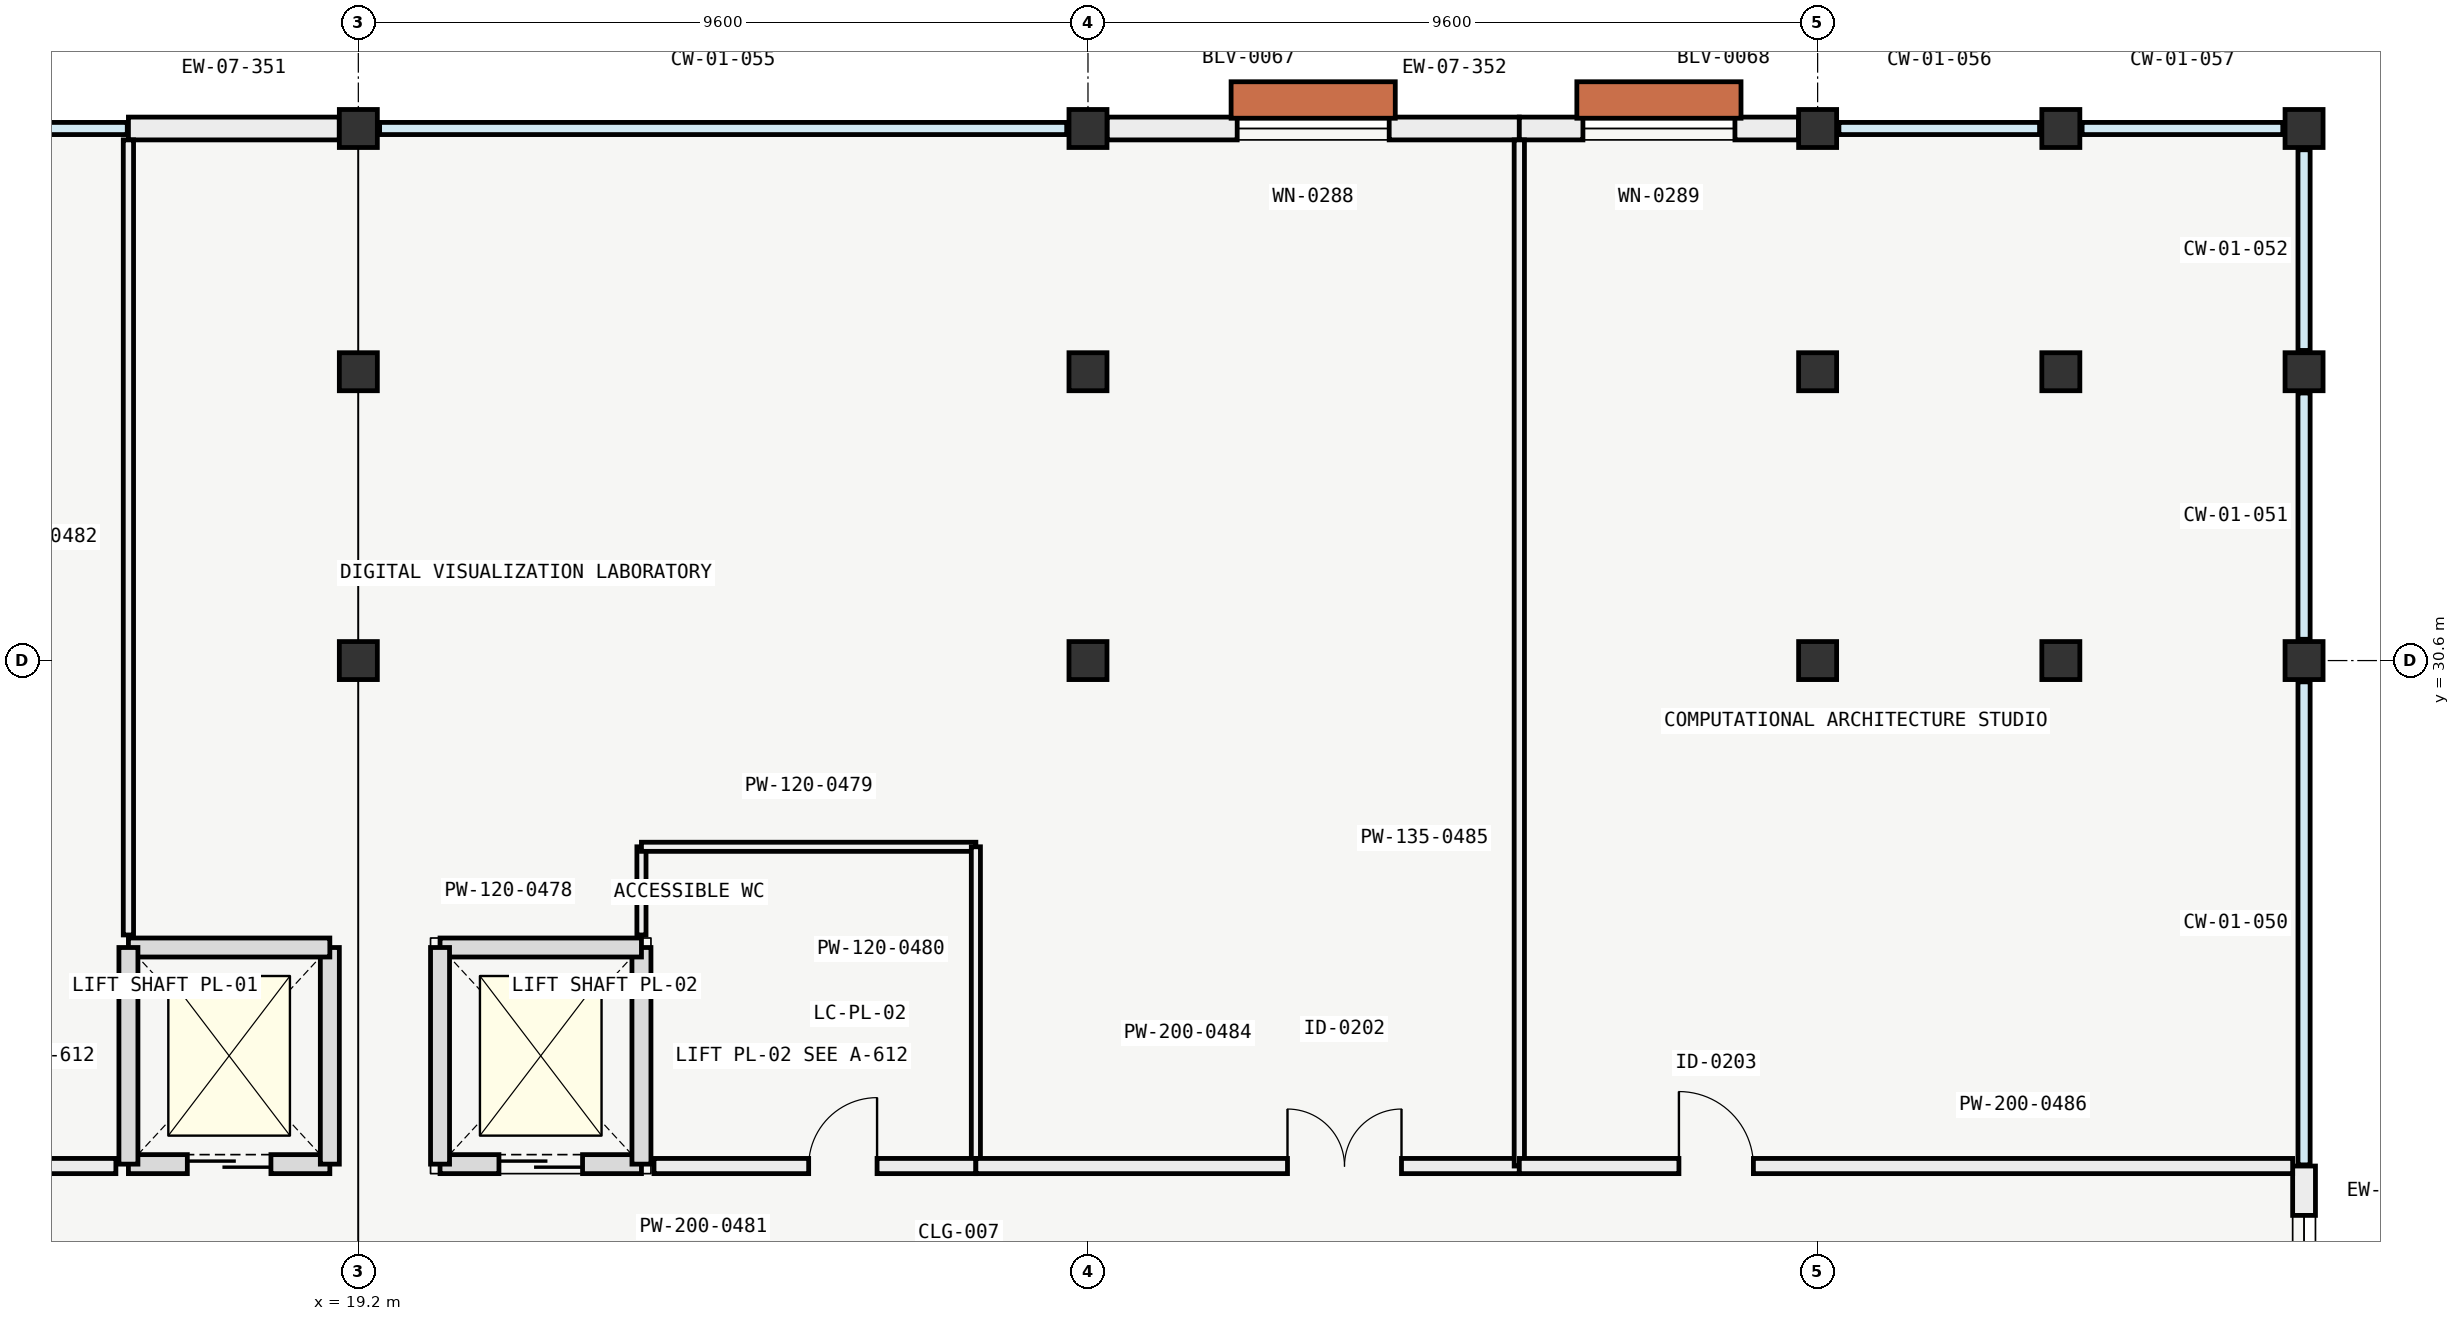
"""IFC4 building model, lengths in metres.
Left out: names, types, materials, properties, quantities, classifications, styles, units other than length and angle.
Written with IfcOpenShell. Run it as: python <this file> out.ifc"""

import sys

from ifc_helpers import new_model, si_unit, direction, frame, frame_2d, origin, origin_2d, place, context, subcontext, project, spatial, rectangle, extrude, element, fill, save


model = new_model("IFC4")
c1 = context("Model", 3, precision=1e-05, world=origin(), true_north=direction((0.0, 1.0)))
c2 = subcontext(c1, "Body", "Model", "MODEL_VIEW")
j1 = project(units=[si_unit("LENGTHUNIT", "METRE"), si_unit("PLANEANGLEUNIT", "RADIAN")], contexts=[c1])
p1 = place(None, origin())
s1 = spatial("IfcSite", under=j1, at=p1, CompositionType="ELEMENT")
p2 = place(p1, origin())
s2 = spatial("IfcBuilding", under=s1, at=p2, CompositionType="ELEMENT")
p3 = place(p2, frame((0.0, 0.0, 26.4)))
s3 = spatial("IfcBuildingStorey", under=s2, at=p3, CompositionType="ELEMENT", Elevation=26.4)
for number, where, z_axis, x_axis in (
    (1, (19.2, 30.6, 0.0), (0.0, 0.0, 1.0), (1.0, 0.0, 0.0)),
    (2, (19.2, 34.4, 0.0), (0.0, 0.0, 1.0), (1.0, 0.0, 0.0)),
    (3, (19.2, 37.6, 0.0), (0.0, 0.0, 1.0), (1.0, 0.0, 0.0)),
    (4, (28.8, 30.6, 0.0), (0.0, 0.0, 1.0), (1.0, 0.0, 0.0)),
    (5, (28.8, 34.4, 0.0), (0.0, 0.0, 1.0), (1.0, 0.0, 0.0)),
    (6, (28.8, 37.6, 0.0), (0.0, 0.0, 1.0), (1.0, 0.0, 0.0)),
    (7, (38.4, 30.6, 0.0), (0.0, 0.0, 1.0), (1.0, 0.0, 0.0)),
    (8, (38.4, 34.4, 0.0), (0.0, 0.0, 1.0), (1.0, 0.0, 0.0)),
    (9, (38.4, 37.6, 0.0), (0.0, 0.0, 1.0), (1.0, 0.0, 0.0)),
    (10, (41.6, 30.6, 0.0), (0.0, 0.0, 1.0), (1.0, 0.0, 0.0)),
    (11, (41.6, 34.4, 0.0), (0.0, 0.0, 1.0), (1.0, 0.0, 0.0)),
    (12, (41.6, 37.6, 0.0), (0.0, 0.0, 1.0), (1.0, 0.0, 0.0)),
    (13, (44.8, 30.6, 0.0), (0.0, 0.0, 1.0), (1.0, 0.0, 0.0)),
    (14, (44.8, 34.4, 0.0), (0.0, 0.0, 1.0), (1.0, 0.0, 0.0)),
    (15, (44.8, 37.6, 0.0), (0.0, 0.0, 1.0), (1.0, 0.0, 0.0)),
):
    element("IfcColumn", number, at=place(p3, frame(where, z_axis=z_axis, x_axis=x_axis)), inside=s3, PredefinedType="COLUMN", context=c2, shape_type="SweptSolid", body=[
        extrude(rectangle(XDim=0.5, YDim=0.5, at=origin_2d()), origin(), (0.0, 0.0, 1.0), 4.2),
    ])
p4 = place(p3, frame((44.8, 23.95, 0.0), z_axis=(0.0, 0.0, 1.0), x_axis=(0.0, -1.0, 0.0)))
e16 = element("IfcWall", 16, at=p4, inside=s3, PredefinedType="SOLIDWALL", context=c2, shape_type="SweptSolid", body=[
    extrude(rectangle(XDim=3.299, YDim=0.3, at=frame_2d((1.649, 0.0))), origin(), (0.0, 0.0, 1.0), 2.355),
])
p5 = place(p4, frame((0.649, 0.0, 0.75)))
e17 = element("IfcOpeningElement", 17, at=p5, cuts=e16, PredefinedType="OPENING", context=c2, shape_type="SweptSolid", body=[
    extrude(rectangle(XDim=2.0, YDim=1.35, at=frame_2d((1.0, 0.675))), frame((0.0, 0.16, 0.0), z_axis=(0.0, -1.0, 0.0), x_axis=(1.0, 0.0, 0.0)), (0.0, 0.0, 1.0), 0.32),
])
p6 = place(p3, frame((16.175, 37.6, 0.0), z_axis=(0.0, 0.0, 1.0), x_axis=(1.0, 0.0, 0.0)))
e18 = element("IfcWall", 18, at=p6, inside=s3, PredefinedType="SOLIDWALL", context=c2, shape_type="SweptSolid", body=[
    extrude(rectangle(XDim=2.774, YDim=0.3, at=frame_2d((1.387, 0.0))), origin(), (0.0, 0.0, 1.0), 2.355),
])
p7 = place(p3, frame((29.051, 37.6, 0.0), z_axis=(0.0, 0.0, 1.0), x_axis=(1.0, 0.0, 0.0)))
e19 = element("IfcWall", 19, at=p7, inside=s3, PredefinedType="SOLIDWALL", context=c2, shape_type="SweptSolid", body=[
    extrude(rectangle(XDim=5.424, YDim=0.3, at=frame_2d((2.712, 0.0))), origin(), (0.0, 0.0, 1.0), 2.355),
])
p8 = place(p7, frame((1.712, 0.0, 0.85)))
e20 = element("IfcOpeningElement", 20, at=p8, cuts=e19, PredefinedType="OPENING", context=c2, shape_type="SweptSolid", body=[
    extrude(rectangle(XDim=2.0, YDim=1.35, at=frame_2d((1.0, 0.675))), frame((0.0, 0.16, 0.0), z_axis=(0.0, -1.0, 0.0), x_axis=(1.0, 0.0, 0.0)), (0.0, 0.0, 1.0), 0.32),
])
p9 = place(p3, frame((34.475, 37.6, 0.0), z_axis=(0.0, 0.0, 1.0), x_axis=(1.0, 0.0, 0.0)))
e21 = element("IfcWall", 21, at=p9, inside=s3, PredefinedType="SOLIDWALL", context=c2, shape_type="SweptSolid", body=[
    extrude(rectangle(XDim=3.674, YDim=0.3, at=frame_2d((1.837, 0.0))), origin(), (0.0, 0.0, 1.0), 2.355),
])
p10 = place(p9, frame((0.837, 0.0, 0.85)))
e22 = element("IfcOpeningElement", 22, at=p10, cuts=e21, PredefinedType="OPENING", context=c2, shape_type="SweptSolid", body=[
    extrude(rectangle(XDim=2.0, YDim=1.35, at=frame_2d((1.0, 0.675))), frame((0.0, 0.16, 0.0), z_axis=(0.0, -1.0, 0.0), x_axis=(1.0, 0.0, 0.0)), (0.0, 0.0, 1.0), 0.32),
])
p11 = place(p3, frame((16.175, 23.975, 0.0), z_axis=(0.0, 0.0, 1.0), x_axis=(1.0, 0.0, 0.0)))
e23 = element("IfcWall", 23, at=p11, inside=s3, PredefinedType="SOLIDWALL", context=c2, shape_type="SweptSolid", body=[
    extrude(rectangle(XDim=2.65, YDim=0.25, at=frame_2d((1.325, 0.0))), origin(), (0.0, 0.0, 1.0), 3.975),
])
p12 = place(p11, frame((0.775, 0.0, 0.0)))
e24 = element("IfcOpeningElement", 24, at=p12, cuts=e23, PredefinedType="OPENING", context=c2, shape_type="SweptSolid", body=[
    extrude(rectangle(XDim=1.1, YDim=2.1, at=frame_2d((0.55, 1.05))), frame((0.0, 0.135, 0.0), z_axis=(0.0, -1.0, 0.0), x_axis=(1.0, 0.0, 0.0)), (0.0, 0.0, 1.0), 0.27),
])
p13 = place(p3, frame((18.825, 23.975, 0.0), z_axis=(0.0, 0.0, 1.0), x_axis=(0.0, 1.0, 0.0)))
e25 = element("IfcWall", 25, at=p13, inside=s3, PredefinedType="SOLIDWALL", context=c2, shape_type="SweptSolid", body=[
    extrude(rectangle(XDim=2.85, YDim=0.25, at=frame_2d((1.425, 0.0))), origin(), (0.0, 0.0, 1.0), 3.975),
])
p14 = place(p3, frame((18.825, 26.825, 0.0), z_axis=(0.0, 0.0, 1.0), x_axis=(-1.0, 0.0, 0.0)))
e26 = element("IfcWall", 26, at=p14, inside=s3, PredefinedType="SOLIDWALL", context=c2, shape_type="SweptSolid", body=[
    extrude(rectangle(XDim=2.65, YDim=0.25, at=frame_2d((1.325, 0.0))), origin(), (0.0, 0.0, 1.0), 3.975),
])
p15 = place(p3, frame((16.175, 26.825, 0.0), z_axis=(0.0, 0.0, 1.0), x_axis=(0.0, -1.0, 0.0)))
e27 = element("IfcWall", 27, at=p15, inside=s3, PredefinedType="SOLIDWALL", context=c2, shape_type="SweptSolid", body=[
    extrude(rectangle(XDim=2.85, YDim=0.25, at=frame_2d((1.425, 0.0))), origin(), (0.0, 0.0, 1.0), 3.975),
])
p16 = place(p3, frame((20.275, 23.975, 0.0), z_axis=(0.0, 0.0, 1.0), x_axis=(1.0, 0.0, 0.0)))
e28 = element("IfcWall", 28, at=p16, inside=s3, PredefinedType="SOLIDWALL", context=c2, shape_type="SweptSolid", body=[
    extrude(rectangle(XDim=2.65, YDim=0.25, at=frame_2d((1.325, 0.0))), origin(), (0.0, 0.0, 1.0), 3.4),
])
p17 = place(p16, frame((0.775, 0.0, 0.0)))
e29 = element("IfcOpeningElement", 29, at=p17, cuts=e28, PredefinedType="OPENING", context=c2, shape_type="SweptSolid", body=[
    extrude(rectangle(XDim=1.1, YDim=2.1, at=frame_2d((0.55, 1.05))), frame((0.0, 0.135, 0.0), z_axis=(0.0, -1.0, 0.0), x_axis=(1.0, 0.0, 0.0)), (0.0, 0.0, 1.0), 0.27),
])
p18 = place(p3, frame((22.925, 23.975, 0.0), z_axis=(0.0, 0.0, 1.0), x_axis=(0.0, 1.0, 0.0)))
e30 = element("IfcWall", 30, at=p18, inside=s3, PredefinedType="SOLIDWALL", context=c2, shape_type="SweptSolid", body=[
    extrude(rectangle(XDim=2.85, YDim=0.25, at=frame_2d((1.425, 0.0))), origin(), (0.0, 0.0, 1.0), 3.4),
])
p19 = place(p3, frame((22.925, 26.825, 0.0), z_axis=(0.0, 0.0, 1.0), x_axis=(-1.0, 0.0, 0.0)))
e31 = element("IfcWall", 31, at=p19, inside=s3, PredefinedType="SOLIDWALL", context=c2, shape_type="SweptSolid", body=[
    extrude(rectangle(XDim=2.65, YDim=0.25, at=frame_2d((1.325, 0.0))), origin(), (0.0, 0.0, 1.0), 3.4),
])
p20 = place(p3, frame((20.275, 26.825, 0.0), z_axis=(0.0, 0.0, 1.0), x_axis=(0.0, -1.0, 0.0)))
e32 = element("IfcWall", 32, at=p20, inside=s3, PredefinedType="SOLIDWALL", context=c2, shape_type="SweptSolid", body=[
    extrude(rectangle(XDim=2.85, YDim=0.25, at=frame_2d((1.425, 0.0))), origin(), (0.0, 0.0, 1.0), 3.4),
])
p21 = place(p3, frame((22.925, 26.99, 0.0), z_axis=(0.0, 0.0, 1.0), x_axis=(0.0, 1.0, 0.0)))
e33 = element("IfcWall", 33, at=p21, inside=s3, PredefinedType="PARTITIONING", context=c2, shape_type="SweptSolid", body=[
    extrude(rectangle(XDim=1.16, YDim=0.12, at=frame_2d((0.58, 0.0))), origin(), (0.0, 0.0, 1.0), 3.85),
])
p22 = place(p3, frame((22.925, 28.15, 0.0), z_axis=(0.0, 0.0, 1.0), x_axis=(1.0, 0.0, 0.0)))
e34 = element("IfcWall", 34, at=p22, inside=s3, PredefinedType="PARTITIONING", context=c2, shape_type="SweptSolid", body=[
    extrude(rectangle(XDim=4.4, YDim=0.12, at=frame_2d((2.2, 0.0))), origin(), (0.0, 0.0, 1.0), 3.85),
])
p23 = place(p3, frame((27.325, 23.95, 0.0), z_axis=(0.0, 0.0, 1.0), x_axis=(0.0, 1.0, 0.0)))
e35 = element("IfcWall", 35, at=p23, inside=s3, PredefinedType="PARTITIONING", context=c2, shape_type="SweptSolid", body=[
    extrude(rectangle(XDim=4.2, YDim=0.12, at=frame_2d((2.1, 0.0))), origin(), (0.0, 0.0, 1.0), 3.505),
])
p24 = place(p3, frame((23.09, 23.95, 0.0), z_axis=(0.0, 0.0, 1.0), x_axis=(1.0, 0.0, 0.0)))
e36 = element("IfcWall", 36, at=p24, inside=s3, PredefinedType="PARTITIONING", context=c2, shape_type="SweptSolid", body=[
    extrude(rectangle(XDim=4.235, YDim=0.2, at=frame_2d((2.117, 0.0))), origin(), (0.0, 0.0, 1.0), 3.85),
])
p25 = place(p24, frame((2.035, 0.0, 0.0)))
e37 = element("IfcOpeningElement", 37, at=p25, cuts=e36, PredefinedType="OPENING", context=c2, shape_type="SweptSolid", body=[
    extrude(rectangle(XDim=0.9, YDim=2.05, at=frame_2d((0.45, 1.025))), frame((0.0, 0.11, 0.0), z_axis=(0.0, -1.0, 0.0), x_axis=(1.0, 0.0, 0.0)), (0.0, 0.0, 1.0), 0.22),
])
p26 = place(p3, frame((16.175, 26.99, 0.0), z_axis=(0.0, 0.0, 1.0), x_axis=(0.0, 1.0, 0.0)))
e38 = element("IfcWall", 38, at=p26, inside=s3, PredefinedType="PARTITIONING", context=c2, shape_type="SweptSolid", body=[
    extrude(rectangle(XDim=10.46, YDim=0.135, at=frame_2d((5.23, 0.0))), origin(), (0.0, 0.0, 1.0), 3.305),
])
p27 = place(p3, frame((0.15, 23.95, 0.0), z_axis=(0.0, 0.0, 1.0), x_axis=(1.0, 0.0, 0.0)))
e39 = element("IfcWall", 39, at=p27, inside=s3, PredefinedType="PARTITIONING", context=c2, shape_type="SweptSolid", body=[
    extrude(rectangle(XDim=15.86, YDim=0.2, at=frame_2d((7.93, 0.0))), origin(), (0.0, 0.0, 1.0), 3.305),
])
p28 = place(p27, frame((6.05, 0.0, 0.0)))
e40 = element("IfcOpeningElement", 40, at=p28, cuts=e39, PredefinedType="OPENING", context=c2, shape_type="SweptSolid", body=[
    extrude(rectangle(XDim=1.5, YDim=2.2, at=frame_2d((0.75, 1.1))), frame((0.0, 0.11, 0.0), z_axis=(0.0, -1.0, 0.0), x_axis=(1.0, 0.0, 0.0)), (0.0, 0.0, 1.0), 0.22),
])
p29 = place(p3, frame((27.325, 23.95, 0.0), z_axis=(0.0, 0.0, 1.0), x_axis=(1.0, 0.0, 0.0)))
e41 = element("IfcWall", 41, at=p29, inside=s3, PredefinedType="PARTITIONING", context=c2, shape_type="SweptSolid", body=[
    extrude(rectangle(XDim=7.15, YDim=0.2, at=frame_2d((3.575, 0.0))), origin(), (0.0, 0.0, 1.0), 3.305),
])
p30 = place(p29, frame((4.1, 0.0, 0.0)))
e42 = element("IfcOpeningElement", 42, at=p30, cuts=e41, PredefinedType="OPENING", context=c2, shape_type="SweptSolid", body=[
    extrude(rectangle(XDim=1.5, YDim=2.2, at=frame_2d((0.75, 1.1))), frame((0.0, 0.11, 0.0), z_axis=(0.0, -1.0, 0.0), x_axis=(1.0, 0.0, 0.0)), (0.0, 0.0, 1.0), 0.22),
])
p31 = place(p3, frame((34.475, 23.95, 0.0), z_axis=(0.0, 0.0, 1.0), x_axis=(0.0, 1.0, 0.0)))
e43 = element("IfcWall", 43, at=p31, inside=s3, PredefinedType="PARTITIONING", context=c2, shape_type="SweptSolid", body=[
    extrude(rectangle(XDim=13.5, YDim=0.135, at=frame_2d((6.75, 0.0))), origin(), (0.0, 0.0, 1.0), 3.305),
])
p32 = place(p3, frame((34.475, 23.95, 0.0), z_axis=(0.0, 0.0, 1.0), x_axis=(1.0, 0.0, 0.0)))
e44 = element("IfcWall", 44, at=p32, inside=s3, PredefinedType="PARTITIONING", context=c2, shape_type="SweptSolid", body=[
    extrude(rectangle(XDim=10.175, YDim=0.2, at=frame_2d((5.087, 0.0))), origin(), (0.0, 0.0, 1.0), 3.305),
])
p33 = place(p32, frame((2.1, 0.0, 0.0)))
e45 = element("IfcOpeningElement", 45, at=p33, cuts=e44, PredefinedType="OPENING", context=c2, shape_type="SweptSolid", body=[
    extrude(rectangle(XDim=0.98, YDim=2.15, at=frame_2d((0.49, 1.075))), frame((0.0, 0.11, 0.0), z_axis=(0.0, -1.0, 0.0), x_axis=(1.0, 0.0, 0.0)), (0.0, 0.0, 1.0), 0.22),
])
p34 = place(p5, origin())
e46 = element("IfcWindow", 46, at=p34, inside=s3, PartitioningType="SINGLE_PANEL", PredefinedType="WINDOW", context=c2, shape_type="SweptSolid", body=[
    extrude(rectangle(XDim=2.0, YDim=1.35, at=frame_2d((1.0, 0.675))), frame((0.0, 0.03, 0.0), z_axis=(0.0, -1.0, 0.0), x_axis=(1.0, 0.0, 0.0)), (0.0, 0.0, 1.0), 0.06),
])
fill(e17, e46)
p35 = place(p8, origin())
e47 = element("IfcWindow", 47, at=p35, inside=s3, PartitioningType="SINGLE_PANEL", PredefinedType="WINDOW", context=c2, shape_type="SweptSolid", body=[
    extrude(rectangle(XDim=2.0, YDim=1.35, at=frame_2d((1.0, 0.675))), frame((0.0, 0.03, 0.0), z_axis=(0.0, -1.0, 0.0), x_axis=(1.0, 0.0, 0.0)), (0.0, 0.0, 1.0), 0.06),
])
fill(e20, e47)
p36 = place(p10, origin())
e48 = element("IfcWindow", 48, at=p36, inside=s3, PartitioningType="SINGLE_PANEL", PredefinedType="WINDOW", context=c2, shape_type="SweptSolid", body=[
    extrude(rectangle(XDim=2.0, YDim=1.35, at=frame_2d((1.0, 0.675))), frame((0.0, 0.03, 0.0), z_axis=(0.0, -1.0, 0.0), x_axis=(1.0, 0.0, 0.0)), (0.0, 0.0, 1.0), 0.06),
])
fill(e22, e48)
p37 = place(p12, origin())
e49 = element("IfcDoor", 49, at=p37, inside=s3, OperationType="SLIDING_TO_LEFT", PredefinedType="DOOR", context=c2, shape_type="SweptSolid", body=[
    extrude(rectangle(XDim=1.1, YDim=2.1, at=frame_2d((0.55, 1.05))), frame((0.0, 0.025, 0.0), z_axis=(0.0, -1.0, 0.0), x_axis=(1.0, 0.0, 0.0)), (0.0, 0.0, 1.0), 0.05),
])
fill(e24, e49)
p38 = place(p17, origin())
e50 = element("IfcDoor", 50, at=p38, inside=s3, OperationType="SLIDING_TO_LEFT", PredefinedType="DOOR", context=c2, shape_type="SweptSolid", body=[
    extrude(rectangle(XDim=1.1, YDim=2.1, at=frame_2d((0.55, 1.05))), frame((0.0, 0.025, 0.0), z_axis=(0.0, -1.0, 0.0), x_axis=(1.0, 0.0, 0.0)), (0.0, 0.0, 1.0), 0.05),
])
fill(e29, e50)
p39 = place(p25, origin())
e51 = element("IfcDoor", 51, at=p39, inside=s3, OperationType="SINGLE_SWING_RIGHT", PredefinedType="DOOR", context=c2, shape_type="SweptSolid", body=[
    extrude(rectangle(XDim=0.9, YDim=2.05, at=frame_2d((0.45, 1.025))), frame((0.0, 0.025, 0.0), z_axis=(0.0, -1.0, 0.0), x_axis=(1.0, 0.0, 0.0)), (0.0, 0.0, 1.0), 0.05),
])
fill(e37, e51)
p40 = place(p30, origin())
e52 = element("IfcDoor", 52, at=p40, inside=s3, OperationType="DOUBLE_DOOR_SINGLE_SWING", PredefinedType="DOOR", context=c2, shape_type="SweptSolid", body=[
    extrude(rectangle(XDim=1.5, YDim=2.2, at=frame_2d((0.75, 1.1))), frame((0.0, 0.025, 0.0), z_axis=(0.0, -1.0, 0.0), x_axis=(1.0, 0.0, 0.0)), (0.0, 0.0, 1.0), 0.05),
])
fill(e42, e52)
p41 = place(p33, origin())
e53 = element("IfcDoor", 53, at=p41, inside=s3, OperationType="SINGLE_SWING_LEFT", PredefinedType="DOOR", context=c2, shape_type="SweptSolid", body=[
    extrude(rectangle(XDim=0.98, YDim=2.15, at=frame_2d((0.49, 1.075))), frame((0.0, 0.025, 0.0), z_axis=(0.0, -1.0, 0.0), x_axis=(1.0, 0.0, 0.0)), (0.0, 0.0, 1.0), 0.05),
])
fill(e45, e53)
save(model, sys.argv[1])
